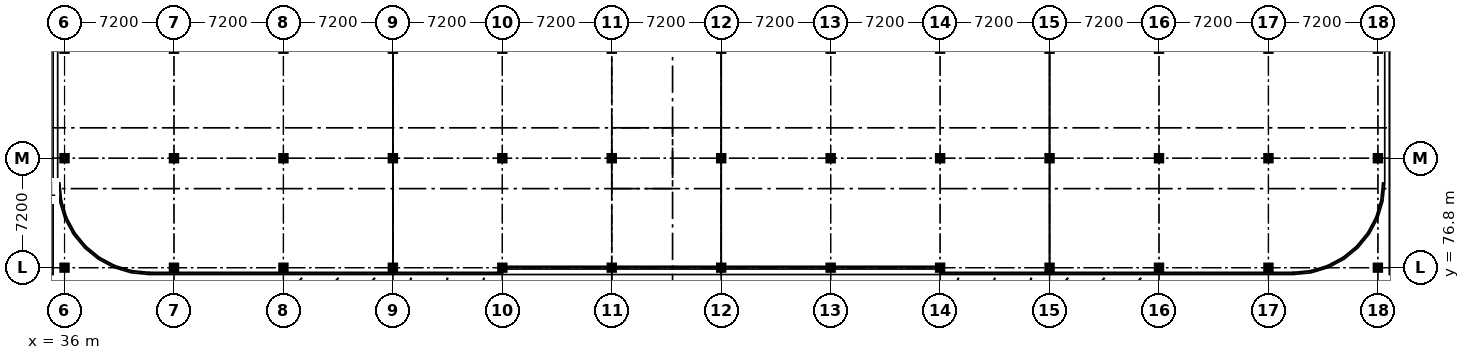
"""IFC4 building model, lengths in metres.
Left out: names, types, materials, properties, quantities, classifications, styles, units other than length and angle.
Written with IfcOpenShell. Run it as: python <this file> out.ifc"""

import sys

from ifc_helpers import new_model, si_unit, direction, frame, origin, origin_2d, place, context, subcontext, project, spatial, i_section, extrude, element, save


model = new_model("IFC4")
c1 = context("Model", 3, precision=1e-05, world=origin(), true_north=direction((0.0, 1.0)))
c2 = subcontext(c1, "Body", "Model", "MODEL_VIEW")
j1 = project(units=[si_unit("LENGTHUNIT", "METRE"), si_unit("PLANEANGLEUNIT", "RADIAN")], contexts=[c1])
p1 = place(None, origin())
s1 = spatial("IfcSite", under=j1, at=p1, CompositionType="ELEMENT")
p2 = place(p1, origin())
s2 = spatial("IfcBuilding", under=s1, at=p2, CompositionType="ELEMENT")
p3 = place(p2, frame((0.0, 0.0, 13.2)))
s3 = spatial("IfcBuildingStorey", under=s2, at=p3, CompositionType="ELEMENT", Elevation=13.2)
p4 = place(p3, frame((36.0, 76.8, 0.0), z_axis=(0.0, 0.0, 1.0), x_axis=(1.0, 0.0, 0.0)))
e1 = element("IfcColumn", 1, at=p4, inside=s3, PredefinedType="COLUMN", context=c2, shape_type="SweptSolid", body=[
    extrude(i_section(OverallWidth=0.371, OverallDepth=0.363, WebThickness=0.013, FlangeThickness=0.022, FilletRadius=0.015, at=origin_2d()), origin(), (0.0, 0.0, 1.0), 3.9),
])
p5 = place(p3, frame((36.0, 84.0, 0.0), z_axis=(0.0, 0.0, 1.0), x_axis=(1.0, 0.0, 0.0)))
e2 = element("IfcColumn", 2, at=p5, inside=s3, PredefinedType="COLUMN", context=c2, shape_type="SweptSolid", body=[
    extrude(i_section(OverallWidth=0.373, OverallDepth=0.373, WebThickness=0.016, FlangeThickness=0.026, FilletRadius=0.015, at=origin_2d()), origin(), (0.0, 0.0, 1.0), 3.9),
])
p6 = place(p3, frame((43.2, 76.8, 0.0), z_axis=(0.0, 0.0, 1.0), x_axis=(1.0, 0.0, 0.0)))
e3 = element("IfcColumn", 3, at=p6, inside=s3, PredefinedType="COLUMN", context=c2, shape_type="SweptSolid", body=[
    extrude(i_section(OverallWidth=0.371, OverallDepth=0.363, WebThickness=0.013, FlangeThickness=0.022, FilletRadius=0.015, at=origin_2d()), origin(), (0.0, 0.0, 1.0), 3.9),
])
p7 = place(p3, frame((43.2, 84.0, 0.0), z_axis=(0.0, 0.0, 1.0), x_axis=(1.0, 0.0, 0.0)))
e4 = element("IfcColumn", 4, at=p7, inside=s3, PredefinedType="COLUMN", context=c2, shape_type="SweptSolid", body=[
    extrude(i_section(OverallWidth=0.373, OverallDepth=0.373, WebThickness=0.016, FlangeThickness=0.026, FilletRadius=0.015, at=origin_2d()), origin(), (0.0, 0.0, 1.0), 3.9),
])
p8 = place(p3, frame((50.4, 76.8, 0.0), z_axis=(0.0, 0.0, 1.0), x_axis=(1.0, 0.0, 0.0)))
e5 = element("IfcColumn", 5, at=p8, inside=s3, PredefinedType="COLUMN", context=c2, shape_type="SweptSolid", body=[
    extrude(i_section(OverallWidth=0.371, OverallDepth=0.363, WebThickness=0.013, FlangeThickness=0.022, FilletRadius=0.015, at=origin_2d()), origin(), (0.0, 0.0, 1.0), 3.9),
])
p9 = place(p3, frame((50.4, 84.0, 0.0), z_axis=(0.0, 0.0, 1.0), x_axis=(1.0, 0.0, 0.0)))
e6 = element("IfcColumn", 6, at=p9, inside=s3, PredefinedType="COLUMN", context=c2, shape_type="SweptSolid", body=[
    extrude(i_section(OverallWidth=0.373, OverallDepth=0.373, WebThickness=0.016, FlangeThickness=0.026, FilletRadius=0.015, at=origin_2d()), origin(), (0.0, 0.0, 1.0), 3.9),
])
p10 = place(p3, frame((57.6, 76.8, 0.0), z_axis=(0.0, 0.0, 1.0), x_axis=(1.0, 0.0, 0.0)))
e7 = element("IfcColumn", 7, at=p10, inside=s3, PredefinedType="COLUMN", context=c2, shape_type="SweptSolid", body=[
    extrude(i_section(OverallWidth=0.371, OverallDepth=0.363, WebThickness=0.013, FlangeThickness=0.022, FilletRadius=0.015, at=origin_2d()), origin(), (0.0, 0.0, 1.0), 3.9),
])
p11 = place(p3, frame((57.6, 84.0, 0.0), z_axis=(0.0, 0.0, 1.0), x_axis=(1.0, 0.0, 0.0)))
e8 = element("IfcColumn", 8, at=p11, inside=s3, PredefinedType="COLUMN", context=c2, shape_type="SweptSolid", body=[
    extrude(i_section(OverallWidth=0.373, OverallDepth=0.373, WebThickness=0.016, FlangeThickness=0.026, FilletRadius=0.015, at=origin_2d()), origin(), (0.0, 0.0, 1.0), 3.9),
])
p12 = place(p3, frame((64.8, 76.8, 0.0), z_axis=(0.0, 0.0, 1.0), x_axis=(1.0, 0.0, 0.0)))
e9 = element("IfcColumn", 9, at=p12, inside=s3, PredefinedType="COLUMN", context=c2, shape_type="SweptSolid", body=[
    extrude(i_section(OverallWidth=0.371, OverallDepth=0.363, WebThickness=0.013, FlangeThickness=0.022, FilletRadius=0.015, at=origin_2d()), origin(), (0.0, 0.0, 1.0), 3.9),
])
p13 = place(p3, frame((64.8, 84.0, 0.0), z_axis=(0.0, 0.0, 1.0), x_axis=(1.0, 0.0, 0.0)))
e10 = element("IfcColumn", 10, at=p13, inside=s3, PredefinedType="COLUMN", context=c2, shape_type="SweptSolid", body=[
    extrude(i_section(OverallWidth=0.373, OverallDepth=0.373, WebThickness=0.016, FlangeThickness=0.026, FilletRadius=0.015, at=origin_2d()), origin(), (0.0, 0.0, 1.0), 3.9),
])
p14 = place(p3, frame((72.0, 76.8, 0.0), z_axis=(0.0, 0.0, 1.0), x_axis=(1.0, 0.0, 0.0)))
e11 = element("IfcColumn", 11, at=p14, inside=s3, PredefinedType="COLUMN", context=c2, shape_type="SweptSolid", body=[
    extrude(i_section(OverallWidth=0.371, OverallDepth=0.363, WebThickness=0.013, FlangeThickness=0.022, FilletRadius=0.015, at=origin_2d()), origin(), (0.0, 0.0, 1.0), 3.9),
])
p15 = place(p3, frame((72.0, 84.0, 0.0), z_axis=(0.0, 0.0, 1.0), x_axis=(1.0, 0.0, 0.0)))
e12 = element("IfcColumn", 12, at=p15, inside=s3, PredefinedType="COLUMN", context=c2, shape_type="SweptSolid", body=[
    extrude(i_section(OverallWidth=0.373, OverallDepth=0.373, WebThickness=0.016, FlangeThickness=0.026, FilletRadius=0.015, at=origin_2d()), origin(), (0.0, 0.0, 1.0), 3.9),
])
p16 = place(p3, frame((79.2, 76.8, 0.0), z_axis=(0.0, 0.0, 1.0), x_axis=(1.0, 0.0, 0.0)))
e13 = element("IfcColumn", 13, at=p16, inside=s3, PredefinedType="COLUMN", context=c2, shape_type="SweptSolid", body=[
    extrude(i_section(OverallWidth=0.371, OverallDepth=0.363, WebThickness=0.013, FlangeThickness=0.022, FilletRadius=0.015, at=origin_2d()), origin(), (0.0, 0.0, 1.0), 3.9),
])
p17 = place(p3, frame((79.2, 84.0, 0.0), z_axis=(0.0, 0.0, 1.0), x_axis=(1.0, 0.0, 0.0)))
e14 = element("IfcColumn", 14, at=p17, inside=s3, PredefinedType="COLUMN", context=c2, shape_type="SweptSolid", body=[
    extrude(i_section(OverallWidth=0.373, OverallDepth=0.373, WebThickness=0.016, FlangeThickness=0.026, FilletRadius=0.015, at=origin_2d()), origin(), (0.0, 0.0, 1.0), 3.9),
])
p18 = place(p3, frame((86.4, 76.8, 0.0), z_axis=(0.0, 0.0, 1.0), x_axis=(1.0, 0.0, 0.0)))
e15 = element("IfcColumn", 15, at=p18, inside=s3, PredefinedType="COLUMN", context=c2, shape_type="SweptSolid", body=[
    extrude(i_section(OverallWidth=0.371, OverallDepth=0.363, WebThickness=0.013, FlangeThickness=0.022, FilletRadius=0.015, at=origin_2d()), origin(), (0.0, 0.0, 1.0), 3.9),
])
p19 = place(p3, frame((86.4, 84.0, 0.0), z_axis=(0.0, 0.0, 1.0), x_axis=(1.0, 0.0, 0.0)))
e16 = element("IfcColumn", 16, at=p19, inside=s3, PredefinedType="COLUMN", context=c2, shape_type="SweptSolid", body=[
    extrude(i_section(OverallWidth=0.373, OverallDepth=0.373, WebThickness=0.016, FlangeThickness=0.026, FilletRadius=0.015, at=origin_2d()), origin(), (0.0, 0.0, 1.0), 3.9),
])
p20 = place(p3, frame((93.6, 76.8, 0.0), z_axis=(0.0, 0.0, 1.0), x_axis=(1.0, 0.0, 0.0)))
e17 = element("IfcColumn", 17, at=p20, inside=s3, PredefinedType="COLUMN", context=c2, shape_type="SweptSolid", body=[
    extrude(i_section(OverallWidth=0.371, OverallDepth=0.363, WebThickness=0.013, FlangeThickness=0.022, FilletRadius=0.015, at=origin_2d()), origin(), (0.0, 0.0, 1.0), 3.9),
])
p21 = place(p3, frame((93.6, 84.0, 0.0), z_axis=(0.0, 0.0, 1.0), x_axis=(1.0, 0.0, 0.0)))
e18 = element("IfcColumn", 18, at=p21, inside=s3, PredefinedType="COLUMN", context=c2, shape_type="SweptSolid", body=[
    extrude(i_section(OverallWidth=0.373, OverallDepth=0.373, WebThickness=0.016, FlangeThickness=0.026, FilletRadius=0.015, at=origin_2d()), origin(), (0.0, 0.0, 1.0), 3.9),
])
p22 = place(p3, frame((100.8, 76.8, 0.0), z_axis=(0.0, 0.0, 1.0), x_axis=(1.0, 0.0, 0.0)))
e19 = element("IfcColumn", 19, at=p22, inside=s3, PredefinedType="COLUMN", context=c2, shape_type="SweptSolid", body=[
    extrude(i_section(OverallWidth=0.371, OverallDepth=0.363, WebThickness=0.013, FlangeThickness=0.022, FilletRadius=0.015, at=origin_2d()), origin(), (0.0, 0.0, 1.0), 3.9),
])
p23 = place(p3, frame((100.8, 84.0, 0.0), z_axis=(0.0, 0.0, 1.0), x_axis=(1.0, 0.0, 0.0)))
e20 = element("IfcColumn", 20, at=p23, inside=s3, PredefinedType="COLUMN", context=c2, shape_type="SweptSolid", body=[
    extrude(i_section(OverallWidth=0.373, OverallDepth=0.373, WebThickness=0.016, FlangeThickness=0.026, FilletRadius=0.015, at=origin_2d()), origin(), (0.0, 0.0, 1.0), 3.9),
])
p24 = place(p3, frame((108.0, 76.8, 0.0), z_axis=(0.0, 0.0, 1.0), x_axis=(1.0, 0.0, 0.0)))
e21 = element("IfcColumn", 21, at=p24, inside=s3, PredefinedType="COLUMN", context=c2, shape_type="SweptSolid", body=[
    extrude(i_section(OverallWidth=0.371, OverallDepth=0.363, WebThickness=0.013, FlangeThickness=0.022, FilletRadius=0.015, at=origin_2d()), origin(), (0.0, 0.0, 1.0), 3.9),
])
p25 = place(p3, frame((108.0, 84.0, 0.0), z_axis=(0.0, 0.0, 1.0), x_axis=(1.0, 0.0, 0.0)))
e22 = element("IfcColumn", 22, at=p25, inside=s3, PredefinedType="COLUMN", context=c2, shape_type="SweptSolid", body=[
    extrude(i_section(OverallWidth=0.373, OverallDepth=0.373, WebThickness=0.016, FlangeThickness=0.026, FilletRadius=0.015, at=origin_2d()), origin(), (0.0, 0.0, 1.0), 3.9),
])
p26 = place(p3, frame((115.2, 76.8, 0.0), z_axis=(0.0, 0.0, 1.0), x_axis=(1.0, 0.0, 0.0)))
e23 = element("IfcColumn", 23, at=p26, inside=s3, PredefinedType="COLUMN", context=c2, shape_type="SweptSolid", body=[
    extrude(i_section(OverallWidth=0.371, OverallDepth=0.363, WebThickness=0.013, FlangeThickness=0.022, FilletRadius=0.015, at=origin_2d()), origin(), (0.0, 0.0, 1.0), 3.9),
])
p27 = place(p3, frame((115.2, 84.0, 0.0), z_axis=(0.0, 0.0, 1.0), x_axis=(1.0, 0.0, 0.0)))
e24 = element("IfcColumn", 24, at=p27, inside=s3, PredefinedType="COLUMN", context=c2, shape_type="SweptSolid", body=[
    extrude(i_section(OverallWidth=0.373, OverallDepth=0.373, WebThickness=0.016, FlangeThickness=0.026, FilletRadius=0.015, at=origin_2d()), origin(), (0.0, 0.0, 1.0), 3.9),
])
p28 = place(p3, frame((122.4, 76.8, 0.0), z_axis=(0.0, 0.0, 1.0), x_axis=(1.0, 0.0, 0.0)))
e25 = element("IfcColumn", 25, at=p28, inside=s3, PredefinedType="COLUMN", context=c2, shape_type="SweptSolid", body=[
    extrude(i_section(OverallWidth=0.371, OverallDepth=0.363, WebThickness=0.013, FlangeThickness=0.022, FilletRadius=0.015, at=origin_2d()), origin(), (0.0, 0.0, 1.0), 3.9),
])
p29 = place(p3, frame((122.4, 84.0, 0.0), z_axis=(0.0, 0.0, 1.0), x_axis=(1.0, 0.0, 0.0)))
e26 = element("IfcColumn", 26, at=p29, inside=s3, PredefinedType="COLUMN", context=c2, shape_type="SweptSolid", body=[
    extrude(i_section(OverallWidth=0.373, OverallDepth=0.373, WebThickness=0.016, FlangeThickness=0.026, FilletRadius=0.015, at=origin_2d()), origin(), (0.0, 0.0, 1.0), 3.9),
])
save(model, sys.argv[1])
